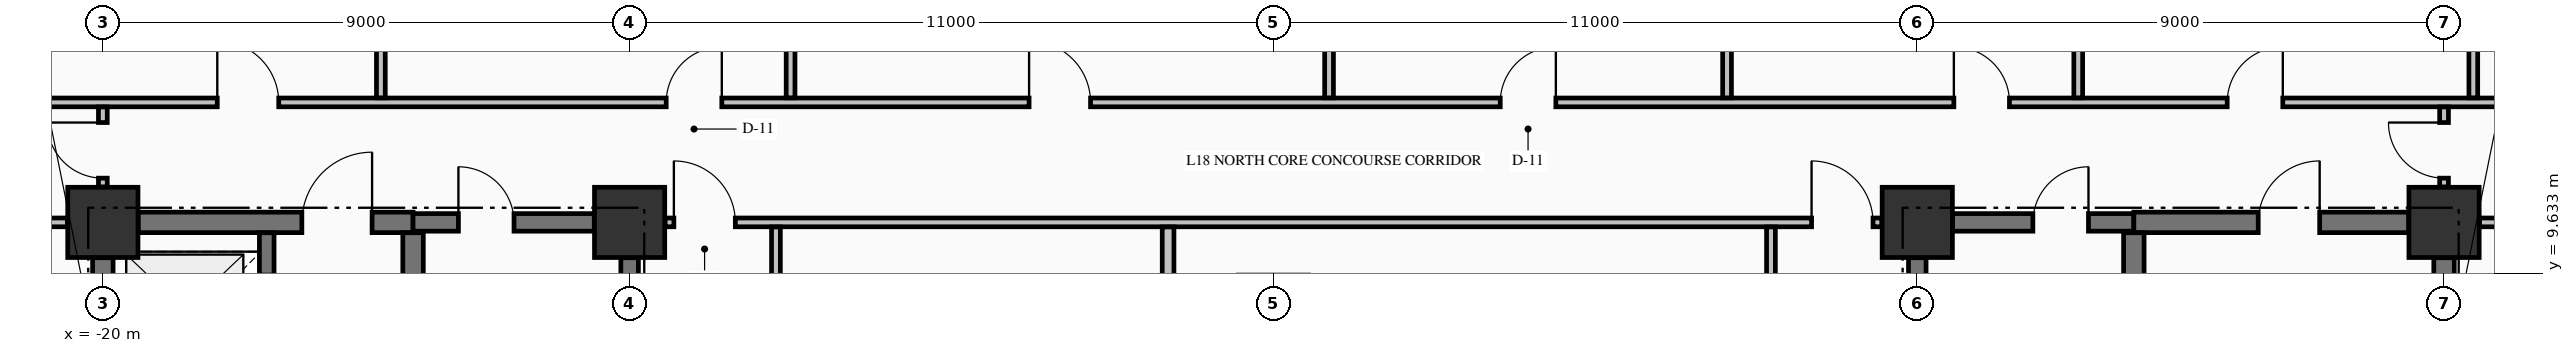
"""IFC4 building model, lengths in metres.
Left out: names, types, materials, properties, quantities, classifications, styles, units other than length and angle.
Written with IfcOpenShell. Run it as: python <this file> out.ifc"""

import sys

from ifc_helpers import new_model, si_unit, direction, frame, frame_2d, origin, origin_2d, place, context, subcontext, project, spatial, rectangle, extrude, element, fill, save


model = new_model("IFC4")
c1 = context("Model", 3, precision=1e-05, world=origin(), true_north=direction((0.0, 1.0)))
c2 = subcontext(c1, "Body", "Model", "MODEL_VIEW")
j1 = project(units=[si_unit("LENGTHUNIT", "METRE"), si_unit("PLANEANGLEUNIT", "RADIAN")], contexts=[c1])
p1 = place(None, origin())
s1 = spatial("IfcSite", under=j1, at=p1, CompositionType="ELEMENT")
p2 = place(p1, origin())
s2 = spatial("IfcBuilding", under=s1, at=p2, CompositionType="ELEMENT")
p3 = place(p2, frame((0.0, 0.0, 75.04)))
s3 = spatial("IfcBuildingStorey", under=s2, at=p3, CompositionType="ELEMENT", Elevation=75.04)
for number, where, z_axis, x_axis in (
    (1, (-20.0, 10.5, -0.25), (0.0, 0.0, 1.0), (1.0, 0.0, 0.0)),
    (2, (-11.0, 10.5, -0.25), (0.0, 0.0, 1.0), (1.0, 0.0, 0.0)),
    (3, (11.0, 10.5, -0.25), (0.0, 0.0, 1.0), (1.0, 0.0, 0.0)),
    (4, (20.0, 10.5, -0.25), (0.0, 0.0, 1.0), (1.0, 0.0, 0.0)),
):
    element("IfcColumn", number, at=place(p3, frame(where, z_axis=z_axis, x_axis=x_axis)), inside=s3, PredefinedType="COLUMN", context=c2, shape_type="SweptSolid", body=[
        extrude(rectangle(XDim=1.2, YDim=1.2, at=origin_2d()), origin(), (0.0, 0.0, 1.0), 3.57),
    ])
p4 = place(p3, frame((-19.396, 10.5, 0.0), z_axis=(0.0, 0.0, 1.0), x_axis=(1.0, 0.0, 0.0)))
e5 = element("IfcWall", 5, at=p4, inside=s3, PredefinedType="SHEAR", context=c2, shape_type="SweptSolid", body=[
    extrude(rectangle(XDim=4.696, YDim=0.35, at=frame_2d((2.348, 0.0))), origin(), (0.0, 0.0, 1.0), 3.32),
])
p5 = place(p4, frame((2.796, 0.0, 0.0)))
e6 = element("IfcOpeningElement", 6, at=p5, cuts=e5, PredefinedType="OPENING", context=c2, shape_type="SweptSolid", body=[
    extrude(rectangle(XDim=1.2, YDim=2.15, at=frame_2d((0.6, 1.075))), frame((0.0, 0.185, 0.0), z_axis=(0.0, -1.0, 0.0), x_axis=(1.0, 0.0, 0.0)), (0.0, 0.0, 1.0), 0.37),
])
p6 = place(p3, frame((-14.7, 10.5, 0.0), z_axis=(0.0, 0.0, 1.0), x_axis=(1.0, 0.0, 0.0)))
e7 = element("IfcWall", 7, at=p6, inside=s3, PredefinedType="SHEAR", context=c2, shape_type="SweptSolid", body=[
    extrude(rectangle(XDim=3.096, YDim=0.3, at=frame_2d((1.548, 0.0))), origin(), (0.0, 0.0, 1.0), 3.32),
])
p7 = place(p6, frame((0.775, 0.0, 0.0)))
e8 = element("IfcOpeningElement", 8, at=p7, cuts=e7, PredefinedType="OPENING", context=c2, shape_type="SweptSolid", body=[
    extrude(rectangle(XDim=0.95, YDim=2.15, at=frame_2d((0.475, 1.075))), frame((0.0, 0.16, 0.0), z_axis=(0.0, -1.0, 0.0), x_axis=(1.0, 0.0, 0.0)), (0.0, 0.0, 1.0), 0.32),
])
p8 = place(p3, frame((11.604, 10.5, 0.0), z_axis=(0.0, 0.0, 1.0), x_axis=(1.0, 0.0, 0.0)))
e9 = element("IfcWall", 9, at=p8, inside=s3, PredefinedType="SHEAR", context=c2, shape_type="SweptSolid", body=[
    extrude(rectangle(XDim=3.096, YDim=0.3, at=frame_2d((1.548, 0.0))), origin(), (0.0, 0.0, 1.0), 3.32),
])
p9 = place(p8, frame((1.371, 0.0, 0.0)))
e10 = element("IfcOpeningElement", 10, at=p9, cuts=e9, PredefinedType="OPENING", context=c2, shape_type="SweptSolid", body=[
    extrude(rectangle(XDim=0.95, YDim=2.15, at=frame_2d((0.475, 1.075))), frame((0.0, 0.16, 0.0), z_axis=(0.0, -1.0, 0.0), x_axis=(1.0, 0.0, 0.0)), (0.0, 0.0, 1.0), 0.32),
])
p10 = place(p3, frame((14.7, 10.5, 0.0), z_axis=(0.0, 0.0, 1.0), x_axis=(1.0, 0.0, 0.0)))
e11 = element("IfcWall", 11, at=p10, inside=s3, PredefinedType="SHEAR", context=c2, shape_type="SweptSolid", body=[
    extrude(rectangle(XDim=4.696, YDim=0.35, at=frame_2d((2.348, 0.0))), origin(), (0.0, 0.0, 1.0), 3.32),
])
p11 = place(p10, frame((2.125, 0.0, 0.0)))
e12 = element("IfcOpeningElement", 12, at=p11, cuts=e11, PredefinedType="OPENING", context=c2, shape_type="SweptSolid", body=[
    extrude(rectangle(XDim=1.05, YDim=2.15, at=frame_2d((0.525, 1.075))), frame((0.0, 0.185, 0.0), z_axis=(0.0, -1.0, 0.0), x_axis=(1.0, 0.0, 0.0)), (0.0, 0.0, 1.0), 0.37),
])
p12 = place(p3, frame((-28.835, 10.5, 0.0), z_axis=(0.0, 0.0, 1.0), x_axis=(1.0, 0.0, 0.0)))
e13 = element("IfcWall", 13, at=p12, inside=s3, PredefinedType="PARTITIONING", context=c2, shape_type="SweptSolid", body=[
    extrude(rectangle(XDim=8.229, YDim=0.15, at=frame_2d((4.115, 0.0))), origin(), (0.0, 0.0, 1.0), 3.32),
])
p13 = place(p12, frame((3.835, 0.0, 0.0)))
e14 = element("IfcOpeningElement", 14, at=p13, cuts=e13, PredefinedType="OPENING", context=c2, shape_type="SweptSolid", body=[
    extrude(rectangle(XDim=1.0, YDim=2.15, at=frame_2d((0.5, 1.075))), frame((0.0, 0.085, 0.0), z_axis=(0.0, -1.0, 0.0), x_axis=(1.0, 0.0, 0.0)), (0.0, 0.0, 1.0), 0.17),
])
p14 = place(p3, frame((-10.394, 10.5, 0.0), z_axis=(0.0, 0.0, 1.0), x_axis=(1.0, 0.0, 0.0)))
e15 = element("IfcWall", 15, at=p14, inside=s3, PredefinedType="PARTITIONING", context=c2, shape_type="SweptSolid", body=[
    extrude(rectangle(XDim=20.788, YDim=0.15, at=frame_2d((10.394, 0.0))), origin(), (0.0, 0.0, 1.0), 3.32),
])
p15 = place(p14, frame((0.15, 0.0, 0.0)))
e16 = element("IfcOpeningElement", 16, at=p15, cuts=e15, PredefinedType="OPENING", context=c2, shape_type="SweptSolid", body=[
    extrude(rectangle(XDim=1.05, YDim=2.15, at=frame_2d((0.525, 1.075))), frame((0.0, 0.085, 0.0), z_axis=(0.0, -1.0, 0.0), x_axis=(1.0, 0.0, 0.0)), (0.0, 0.0, 1.0), 0.17),
])
p16 = place(p14, frame((19.588, 0.0, 0.0)))
e17 = element("IfcOpeningElement", 17, at=p16, cuts=e15, PredefinedType="OPENING", context=c2, shape_type="SweptSolid", body=[
    extrude(rectangle(XDim=1.05, YDim=2.15, at=frame_2d((0.525, 1.075))), frame((0.0, 0.085, 0.0), z_axis=(0.0, -1.0, 0.0), x_axis=(1.0, 0.0, 0.0)), (0.0, 0.0, 1.0), 0.17),
])
p17 = place(p3, frame((20.606, 10.5, 0.0), z_axis=(0.0, 0.0, 1.0), x_axis=(1.0, 0.0, 0.0)))
e18 = element("IfcWall", 18, at=p17, inside=s3, PredefinedType="PARTITIONING", context=c2, shape_type="SweptSolid", body=[
    extrude(rectangle(XDim=3.229, YDim=0.15, at=frame_2d((1.615, 0.0))), origin(), (0.0, 0.0, 1.0), 3.32),
])
p18 = place(p17, frame((0.919, 0.0, 0.0)))
e19 = element("IfcOpeningElement", 19, at=p18, cuts=e18, PredefinedType="OPENING", context=c2, shape_type="SweptSolid", body=[
    extrude(rectangle(XDim=0.95, YDim=2.15, at=frame_2d((0.475, 1.075))), frame((0.0, 0.085, 0.0), z_axis=(0.0, -1.0, 0.0), x_axis=(1.0, 0.0, 0.0)), (0.0, 0.0, 1.0), 0.17),
])
p19 = place(p3, frame((-28.835, 12.55, 0.0), z_axis=(0.0, 0.0, 1.0), x_axis=(1.0, 0.0, 0.0)))
e20 = element("IfcWall", 20, at=p19, inside=s3, PredefinedType="PARTITIONING", context=c2, shape_type="SweptSolid", body=[
    extrude(rectangle(XDim=52.67, YDim=0.15, at=frame_2d((26.335, 0.0))), origin(), (0.0, 0.0, 1.0), 3.32),
])
p20 = place(p19, frame((10.79, 0.0, 0.0)))
e21 = element("IfcOpeningElement", 21, at=p20, cuts=e20, PredefinedType="OPENING", context=c2, shape_type="SweptSolid", body=[
    extrude(rectangle(XDim=1.05, YDim=2.15, at=frame_2d((0.525, 1.075))), frame((0.0, 0.085, 0.0), z_axis=(0.0, -1.0, 0.0), x_axis=(1.0, 0.0, 0.0)), (0.0, 0.0, 1.0), 0.17),
])
p21 = place(p19, frame((18.46, 0.0, 0.0)))
e22 = element("IfcOpeningElement", 22, at=p21, cuts=e20, PredefinedType="OPENING", context=c2, shape_type="SweptSolid", body=[
    extrude(rectangle(XDim=0.95, YDim=2.15, at=frame_2d((0.475, 1.075))), frame((0.0, 0.085, 0.0), z_axis=(0.0, -1.0, 0.0), x_axis=(1.0, 0.0, 0.0)), (0.0, 0.0, 1.0), 0.17),
])
p22 = place(p19, frame((24.66, 0.0, 0.0)))
e23 = element("IfcOpeningElement", 23, at=p22, cuts=e20, PredefinedType="OPENING", context=c2, shape_type="SweptSolid", body=[
    extrude(rectangle(XDim=1.05, YDim=2.15, at=frame_2d((0.525, 1.075))), frame((0.0, 0.085, 0.0), z_axis=(0.0, -1.0, 0.0), x_axis=(1.0, 0.0, 0.0)), (0.0, 0.0, 1.0), 0.17),
])
p23 = place(p19, frame((32.71, 0.0, 0.0)))
e24 = element("IfcOpeningElement", 24, at=p23, cuts=e20, PredefinedType="OPENING", context=c2, shape_type="SweptSolid", body=[
    extrude(rectangle(XDim=0.95, YDim=2.15, at=frame_2d((0.475, 1.075))), frame((0.0, 0.085, 0.0), z_axis=(0.0, -1.0, 0.0), x_axis=(1.0, 0.0, 0.0)), (0.0, 0.0, 1.0), 0.17),
])
p24 = place(p19, frame((40.46, 0.0, 0.0)))
e25 = element("IfcOpeningElement", 25, at=p24, cuts=e20, PredefinedType="OPENING", context=c2, shape_type="SweptSolid", body=[
    extrude(rectangle(XDim=0.95, YDim=2.15, at=frame_2d((0.475, 1.075))), frame((0.0, 0.085, 0.0), z_axis=(0.0, -1.0, 0.0), x_axis=(1.0, 0.0, 0.0)), (0.0, 0.0, 1.0), 0.17),
])
p25 = place(p19, frame((45.13, 0.0, 0.0)))
e26 = element("IfcOpeningElement", 26, at=p25, cuts=e20, PredefinedType="OPENING", context=c2, shape_type="SweptSolid", body=[
    extrude(rectangle(XDim=0.95, YDim=2.15, at=frame_2d((0.475, 1.075))), frame((0.0, 0.085, 0.0), z_axis=(0.0, -1.0, 0.0), x_axis=(1.0, 0.0, 0.0)), (0.0, 0.0, 1.0), 0.17),
])
p26 = place(p3, frame((-20.0, 7.727, 0.0), z_axis=(0.0, 0.0, 1.0), x_axis=(0.0, 1.0, 0.0)))
e27 = element("IfcWall", 27, at=p26, inside=s3, PredefinedType="SHEAR", context=c2, shape_type="SweptSolid", body=[
    extrude(rectangle(XDim=2.169, YDim=0.35, at=frame_2d((1.084, 0.0))), origin(), (0.0, 0.0, 1.0), 3.32),
])
p27 = place(p3, frame((-17.2, 7.727, 0.0), z_axis=(0.0, 0.0, 1.0), x_axis=(0.0, 1.0, 0.0)))
e28 = element("IfcWall", 28, at=p27, inside=s3, PredefinedType="SOLIDWALL", context=c2, shape_type="SweptSolid", body=[
    extrude(rectangle(XDim=2.596, YDim=0.25, at=frame_2d((1.298, 0.0))), origin(), (0.0, 0.0, 1.0), 3.32),
])
p28 = place(p27, frame((0.773, 0.0, 0.0)))
e29 = element("IfcOpeningElement", 29, at=p28, cuts=e28, PredefinedType="OPENING", context=c2, shape_type="SweptSolid", body=[
    extrude(rectangle(XDim=1.1, YDim=2.2, at=frame_2d((0.55, 1.1))), frame((0.0, 0.135, 0.0), z_axis=(0.0, -1.0, 0.0), x_axis=(1.0, 0.0, 0.0)), (0.0, 0.0, 1.0), 0.27),
])
p29 = place(p3, frame((-14.7, 5.852, 0.0), z_axis=(0.0, 0.0, 1.0), x_axis=(0.0, 1.0, 0.0)))
e30 = element("IfcWall", 30, at=p29, inside=s3, PredefinedType="SHEAR", context=c2, shape_type="SweptSolid", body=[
    extrude(rectangle(XDim=4.471, YDim=0.35, at=frame_2d((2.235, 0.0))), origin(), (0.0, 0.0, 1.0), 3.32),
])
for number, where, z_axis, x_axis in (
    (31, (-11.0, 5.852, 0.0), (0.0, 0.0, 1.0), (0.0, 1.0, 0.0)),
    (32, (11.0, 5.852, 0.0), (0.0, 0.0, 1.0), (0.0, 1.0, 0.0)),
):
    element("IfcWall", number, at=place(p3, frame(where, z_axis=z_axis, x_axis=x_axis)), inside=s3, PredefinedType="SHEAR", context=c2, shape_type="SweptSolid", body=[
        extrude(rectangle(XDim=4.044, YDim=0.3, at=frame_2d((2.022, 0.0))), origin(), (0.0, 0.0, 1.0), 3.32),
    ])
p30 = place(p3, frame((14.7, 5.852, 0.0), z_axis=(0.0, 0.0, 1.0), x_axis=(0.0, 1.0, 0.0)))
e33 = element("IfcWall", 33, at=p30, inside=s3, PredefinedType="SHEAR", context=c2, shape_type="SweptSolid", body=[
    extrude(rectangle(XDim=4.471, YDim=0.35, at=frame_2d((2.235, 0.0))), origin(), (0.0, 0.0, 1.0), 3.32),
])
p31 = place(p3, frame((20.0, 0.604, 0.0), z_axis=(0.0, 0.0, 1.0), x_axis=(0.0, 1.0, 0.0)))
e34 = element("IfcWall", 34, at=p31, inside=s3, PredefinedType="SHEAR", context=c2, shape_type="SweptSolid", body=[
    extrude(rectangle(XDim=9.292, YDim=0.35, at=frame_2d((4.646, 0.0))), origin(), (0.0, 0.0, 1.0), 3.32),
])
p32 = place(p3, frame((-20.0, 11.106, 0.0), z_axis=(0.0, 0.0, 1.0), x_axis=(0.0, 1.0, 0.0)))
e35 = element("IfcWall", 35, at=p32, inside=s3, PredefinedType="PARTITIONING", context=c2, shape_type="SweptSolid", body=[
    extrude(rectangle(XDim=1.366, YDim=0.15, at=frame_2d((0.683, 0.0))), origin(), (0.0, 0.0, 1.0), 2.66),
])
p33 = place(p32, frame((0.15, 0.0, 0.0)))
e36 = element("IfcOpeningElement", 36, at=p33, cuts=e35, PredefinedType="OPENING", context=c2, shape_type="SweptSolid", body=[
    extrude(rectangle(XDim=0.95, YDim=2.15, at=frame_2d((0.475, 1.075))), frame((0.0, 0.085, 0.0), z_axis=(0.0, -1.0, 0.0), x_axis=(1.0, 0.0, 0.0)), (0.0, 0.0, 1.0), 0.17),
])
p34 = place(p3, frame((-15.25, 12.628, 0.0), z_axis=(0.0, 0.0, 1.0), x_axis=(0.0, 1.0, 0.0)))
e37 = element("IfcWall", 37, at=p34, inside=s3, PredefinedType="PARTITIONING", context=c2, shape_type="SweptSolid", body=[
    extrude(rectangle(XDim=13.707, YDim=0.15, at=frame_2d((6.854, 0.0))), origin(), (0.0, 0.0, 1.0), 3.32),
])
p35 = place(p3, frame((-8.5, 0.903, 0.0), z_axis=(0.0, 0.0, 1.0), x_axis=(0.0, 1.0, 0.0)))
e38 = element("IfcWall", 38, at=p35, inside=s3, PredefinedType="PARTITIONING", context=c2, shape_type="SweptSolid", body=[
    extrude(rectangle(XDim=9.519, YDim=0.15, at=frame_2d((4.76, 0.0))), origin(), (0.0, 0.0, 1.0), 3.32),
])
p36 = place(p35, frame((4.222, 0.0, 0.0)))
e39 = element("IfcOpeningElement", 39, at=p36, cuts=e38, PredefinedType="OPENING", context=c2, shape_type="SweptSolid", body=[
    extrude(rectangle(XDim=1.05, YDim=2.15, at=frame_2d((0.525, 1.075))), frame((0.0, 0.085, 0.0), z_axis=(0.0, -1.0, 0.0), x_axis=(1.0, 0.0, 0.0)), (0.0, 0.0, 1.0), 0.17),
])
p37 = place(p3, frame((-8.25, 12.628, 0.0), z_axis=(0.0, 0.0, 1.0), x_axis=(0.0, 1.0, 0.0)))
e40 = element("IfcWall", 40, at=p37, inside=s3, PredefinedType="PARTITIONING", context=c2, shape_type="SweptSolid", body=[
    extrude(rectangle(XDim=13.707, YDim=0.15, at=frame_2d((6.854, 0.0))), origin(), (0.0, 0.0, 1.0), 3.32),
])
p38 = place(p3, frame((-1.8, 0.903, 0.0), z_axis=(0.0, 0.0, 1.0), x_axis=(0.0, 1.0, 0.0)))
e41 = element("IfcWall", 41, at=p38, inside=s3, PredefinedType="PARTITIONING", context=c2, shape_type="SweptSolid", body=[
    extrude(rectangle(XDim=9.519, YDim=0.2, at=frame_2d((4.76, 0.0))), origin(), (0.0, 0.0, 1.0), 3.32),
])
for number, where, z_axis, x_axis in (
    (42, (0.95, 12.628, 0.0), (0.0, 0.0, 1.0), (0.0, 1.0, 0.0)),
    (43, (7.75, 12.628, 0.0), (0.0, 0.0, 1.0), (0.0, 1.0, 0.0)),
):
    element("IfcWall", number, at=place(p3, frame(where, z_axis=z_axis, x_axis=x_axis)), inside=s3, PredefinedType="PARTITIONING", context=c2, shape_type="SweptSolid", body=[
        extrude(rectangle(XDim=13.812, YDim=0.15, at=frame_2d((6.906, 0.0))), origin(), (0.0, 0.0, 1.0), 3.32),
    ])
p39 = place(p3, frame((8.5, 0.303, 0.0), z_axis=(0.0, 0.0, 1.0), x_axis=(0.0, 1.0, 0.0)))
e44 = element("IfcWall", 44, at=p39, inside=s3, PredefinedType="PARTITIONING", context=c2, shape_type="SweptSolid", body=[
    extrude(rectangle(XDim=10.119, YDim=0.15, at=frame_2d((5.06, 0.0))), origin(), (0.0, 0.0, 1.0), 3.32),
])
p40 = place(p39, frame((4.497, 0.0, 0.0)))
e45 = element("IfcOpeningElement", 45, at=p40, cuts=e44, PredefinedType="OPENING", context=c2, shape_type="SweptSolid", body=[
    extrude(rectangle(XDim=1.1, YDim=2.15, at=frame_2d((0.55, 1.075))), frame((0.0, 0.085, 0.0), z_axis=(0.0, -1.0, 0.0), x_axis=(1.0, 0.0, 0.0)), (0.0, 0.0, 1.0), 0.17),
])
p41 = place(p3, frame((13.75, 12.628, 0.0), z_axis=(0.0, 0.0, 1.0), x_axis=(0.0, 1.0, 0.0)))
e46 = element("IfcWall", 46, at=p41, inside=s3, PredefinedType="PARTITIONING", context=c2, shape_type="SweptSolid", body=[
    extrude(rectangle(XDim=13.707, YDim=0.15, at=frame_2d((6.854, 0.0))), origin(), (0.0, 0.0, 1.0), 3.32),
])
p42 = place(p3, frame((20.0, 11.106, 0.0), z_axis=(0.0, 0.0, 1.0), x_axis=(0.0, 1.0, 0.0)))
e47 = element("IfcWall", 47, at=p42, inside=s3, PredefinedType="PARTITIONING", context=c2, shape_type="SweptSolid", body=[
    extrude(rectangle(XDim=1.366, YDim=0.15, at=frame_2d((0.683, 0.0))), origin(), (0.0, 0.0, 1.0), 3.32),
])
p43 = place(p42, frame((0.15, 0.0, 0.0)))
e48 = element("IfcOpeningElement", 48, at=p43, cuts=e47, PredefinedType="OPENING", context=c2, shape_type="SweptSolid", body=[
    extrude(rectangle(XDim=0.95, YDim=2.15, at=frame_2d((0.475, 1.075))), frame((0.0, 0.085, 0.0), z_axis=(0.0, -1.0, 0.0), x_axis=(1.0, 0.0, 0.0)), (0.0, 0.0, 1.0), 0.17),
])
p44 = place(p3, frame((20.5, 12.628, 0.0), z_axis=(0.0, 0.0, 1.0), x_axis=(0.0, 1.0, 0.0)))
e49 = element("IfcWall", 49, at=p44, inside=s3, PredefinedType="PARTITIONING", context=c2, shape_type="SweptSolid", body=[
    extrude(rectangle(XDim=9.666, YDim=0.15, at=frame_2d((4.833, 0.0))), origin(), (0.0, 0.0, 1.0), 3.32),
])
p45 = place(p7, origin())
e50 = element("IfcDoor", 50, at=p45, inside=s3, OperationType="SINGLE_SWING_LEFT", PredefinedType="DOOR", context=c2, shape_type="SweptSolid", body=[
    extrude(rectangle(XDim=0.95, YDim=2.15, at=frame_2d((0.475, 1.075))), frame((0.0, 0.025, 0.0), z_axis=(0.0, -1.0, 0.0), x_axis=(1.0, 0.0, 0.0)), (0.0, 0.0, 1.0), 0.05),
])
fill(e8, e50)
p46 = place(p9, origin())
e51 = element("IfcDoor", 51, at=p46, inside=s3, OperationType="SINGLE_SWING_RIGHT", PredefinedType="DOOR", context=c2, shape_type="SweptSolid", body=[
    extrude(rectangle(XDim=0.95, YDim=2.15, at=frame_2d((0.475, 1.075))), frame((0.0, 0.025, 0.0), z_axis=(0.0, -1.0, 0.0), x_axis=(1.0, 0.0, 0.0)), (0.0, 0.0, 1.0), 0.05),
])
fill(e10, e51)
p47 = place(p5, origin())
e52 = element("IfcDoor", 52, at=p47, inside=s3, OperationType="SINGLE_SWING_RIGHT", PredefinedType="DOOR", context=c2, shape_type="SweptSolid", body=[
    extrude(rectangle(XDim=1.2, YDim=2.15, at=frame_2d((0.6, 1.075))), frame((0.0, 0.025, 0.0), z_axis=(0.0, -1.0, 0.0), x_axis=(1.0, 0.0, 0.0)), (0.0, 0.0, 1.0), 0.05),
])
fill(e6, e52)
p48 = place(p11, origin())
e53 = element("IfcDoor", 53, at=p48, inside=s3, OperationType="SINGLE_SWING_RIGHT", PredefinedType="DOOR", context=c2, shape_type="SweptSolid", body=[
    extrude(rectangle(XDim=1.05, YDim=2.15, at=frame_2d((0.525, 1.075))), frame((0.0, 0.025, 0.0), z_axis=(0.0, -1.0, 0.0), x_axis=(1.0, 0.0, 0.0)), (0.0, 0.0, 1.0), 0.05),
])
fill(e12, e53)
p49 = place(p15, origin())
e54 = element("IfcDoor", 54, at=p49, inside=s3, OperationType="SINGLE_SWING_LEFT", PredefinedType="DOOR", context=c2, shape_type="SweptSolid", body=[
    extrude(rectangle(XDim=1.05, YDim=2.15, at=frame_2d((0.525, 1.075))), frame((0.0, 0.025, 0.0), z_axis=(0.0, -1.0, 0.0), x_axis=(1.0, 0.0, 0.0)), (0.0, 0.0, 1.0), 0.05),
])
fill(e16, e54)
p50 = place(p16, origin())
e55 = element("IfcDoor", 55, at=p50, inside=s3, OperationType="SINGLE_SWING_LEFT", PredefinedType="DOOR", context=c2, shape_type="SweptSolid", body=[
    extrude(rectangle(XDim=1.05, YDim=2.15, at=frame_2d((0.525, 1.075))), frame((0.0, 0.025, 0.0), z_axis=(0.0, -1.0, 0.0), x_axis=(1.0, 0.0, 0.0)), (0.0, 0.0, 1.0), 0.05),
])
fill(e17, e55)
p51 = place(p20, origin())
e56 = element("IfcDoor", 56, at=p51, inside=s3, OperationType="SINGLE_SWING_LEFT", PredefinedType="DOOR", context=c2, shape_type="SweptSolid", body=[
    extrude(rectangle(XDim=1.05, YDim=2.15, at=frame_2d((0.525, 1.075))), frame((0.0, 0.025, 0.0), z_axis=(0.0, -1.0, 0.0), x_axis=(1.0, 0.0, 0.0)), (0.0, 0.0, 1.0), 0.05),
])
fill(e21, e56)
p52 = place(p21, origin())
e57 = element("IfcDoor", 57, at=p52, inside=s3, OperationType="SINGLE_SWING_RIGHT", PredefinedType="DOOR", context=c2, shape_type="SweptSolid", body=[
    extrude(rectangle(XDim=0.95, YDim=2.15, at=frame_2d((0.475, 1.075))), frame((0.0, 0.025, 0.0), z_axis=(0.0, -1.0, 0.0), x_axis=(1.0, 0.0, 0.0)), (0.0, 0.0, 1.0), 0.05),
])
fill(e22, e57)
p53 = place(p22, origin())
e58 = element("IfcDoor", 58, at=p53, inside=s3, OperationType="SINGLE_SWING_LEFT", PredefinedType="DOOR", context=c2, shape_type="SweptSolid", body=[
    extrude(rectangle(XDim=1.05, YDim=2.15, at=frame_2d((0.525, 1.075))), frame((0.0, 0.025, 0.0), z_axis=(0.0, -1.0, 0.0), x_axis=(1.0, 0.0, 0.0)), (0.0, 0.0, 1.0), 0.05),
])
fill(e23, e58)
p54 = place(p23, origin())
e59 = element("IfcDoor", 59, at=p54, inside=s3, OperationType="SINGLE_SWING_RIGHT", PredefinedType="DOOR", context=c2, shape_type="SweptSolid", body=[
    extrude(rectangle(XDim=0.95, YDim=2.15, at=frame_2d((0.475, 1.075))), frame((0.0, 0.025, 0.0), z_axis=(0.0, -1.0, 0.0), x_axis=(1.0, 0.0, 0.0)), (0.0, 0.0, 1.0), 0.05),
])
fill(e24, e59)
p55 = place(p24, origin())
e60 = element("IfcDoor", 60, at=p55, inside=s3, OperationType="SINGLE_SWING_LEFT", PredefinedType="DOOR", context=c2, shape_type="SweptSolid", body=[
    extrude(rectangle(XDim=0.95, YDim=2.15, at=frame_2d((0.475, 1.075))), frame((0.0, 0.025, 0.0), z_axis=(0.0, -1.0, 0.0), x_axis=(1.0, 0.0, 0.0)), (0.0, 0.0, 1.0), 0.05),
])
fill(e25, e60)
p56 = place(p25, origin())
e61 = element("IfcDoor", 61, at=p56, inside=s3, OperationType="SINGLE_SWING_RIGHT", PredefinedType="DOOR", context=c2, shape_type="SweptSolid", body=[
    extrude(rectangle(XDim=0.95, YDim=2.15, at=frame_2d((0.475, 1.075))), frame((0.0, 0.025, 0.0), z_axis=(0.0, -1.0, 0.0), x_axis=(1.0, 0.0, 0.0)), (0.0, 0.0, 1.0), 0.05),
])
fill(e26, e61)
p57 = place(p33, origin())
e62 = element("IfcDoor", 62, at=p57, inside=s3, OperationType="SINGLE_SWING_RIGHT", PredefinedType="DOOR", context=c2, shape_type="SweptSolid", body=[
    extrude(rectangle(XDim=0.95, YDim=2.15, at=frame_2d((0.475, 1.075))), frame((0.0, 0.025, 0.0), z_axis=(0.0, -1.0, 0.0), x_axis=(1.0, 0.0, 0.0)), (0.0, 0.0, 1.0), 0.05),
])
fill(e36, e62)
p58 = place(p43, origin())
e63 = element("IfcDoor", 63, at=p58, inside=s3, OperationType="SINGLE_SWING_RIGHT", PredefinedType="DOOR", context=c2, shape_type="SweptSolid", body=[
    extrude(rectangle(XDim=0.95, YDim=2.15, at=frame_2d((0.475, 1.075))), frame((0.0, 0.025, 0.0), z_axis=(0.0, -1.0, 0.0), x_axis=(1.0, 0.0, 0.0)), (0.0, 0.0, 1.0), 0.05),
])
fill(e48, e63)
save(model, sys.argv[1])
